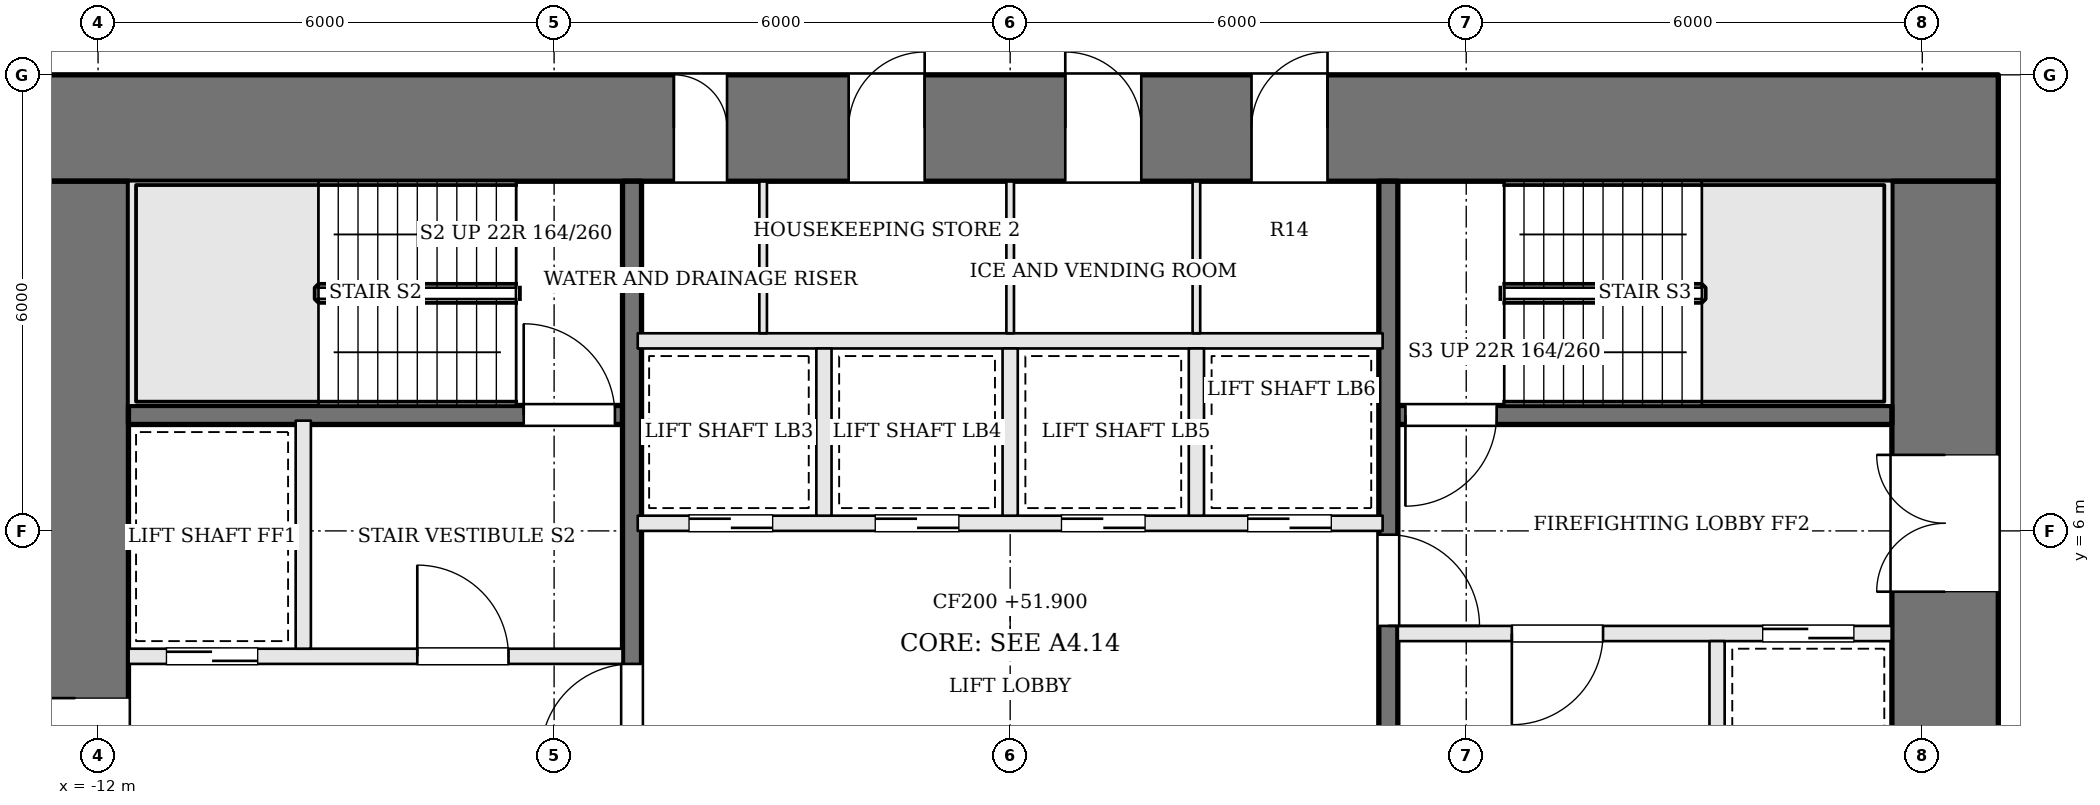
"""IFC4 building model, lengths in metres.
Left out: names, types, materials, properties, quantities, classifications, styles, units other than length and angle.
Written with IfcOpenShell. Run it as: python <this file> out.ifc"""

import sys

from ifc_helpers import new_model, si_unit, direction, frame, frame_2d, origin, place, context, subcontext, project, spatial, rectangle, extrude, element, fill, save


model = new_model("IFC4")
c1 = context("Model", 3, precision=1e-05, world=origin(), true_north=direction((0.0, 1.0)))
c2 = subcontext(c1, "Body", "Model", "MODEL_VIEW")
j1 = project(units=[si_unit("LENGTHUNIT", "METRE"), si_unit("PLANEANGLEUNIT", "RADIAN")], contexts=[c1])
p1 = place(None, origin())
s1 = spatial("IfcSite", under=j1, at=p1, CompositionType="ELEMENT")
p2 = place(p1, origin())
s2 = spatial("IfcBuilding", under=s1, at=p2, CompositionType="ELEMENT")
p3 = place(p2, frame((0.0, 0.0, 51.9)))
s3 = spatial("IfcBuildingStorey", under=s2, at=p3, CompositionType="ELEMENT", Elevation=51.9)
p4 = place(p3, frame((-13.0, 11.3, 0.0), z_axis=(0.0, 0.0, 1.0), x_axis=(1.0, 0.0, 0.0)))
e1 = element("IfcWall", 1, at=p4, inside=s3, PredefinedType="SHEAR", context=c2, shape_type="SweptSolid", body=[
    extrude(rectangle(XDim=26.0, YDim=1.4, at=frame_2d((13.0, 0.0))), origin(), (0.0, 0.0, 1.0), 3.6),
])
p5 = place(p4, frame((8.575, 0.0, 0.0)))
e2 = element("IfcOpeningElement", 2, at=p5, cuts=e1, PredefinedType="OPENING", context=c2, shape_type="SweptSolid", body=[
    extrude(rectangle(XDim=0.7, YDim=2.1, at=frame_2d((0.35, 1.05))), frame((0.0, 0.71, 0.0), z_axis=(0.0, -1.0, 0.0), x_axis=(1.0, 0.0, 0.0)), (0.0, 0.0, 1.0), 1.42),
])
p6 = place(p4, frame((10.875, 0.0, 0.0)))
e3 = element("IfcOpeningElement", 3, at=p6, cuts=e1, PredefinedType="OPENING", context=c2, shape_type="SweptSolid", body=[
    extrude(rectangle(XDim=1.0, YDim=2.1, at=frame_2d((0.5, 1.05))), frame((0.0, 0.71, 0.0), z_axis=(0.0, -1.0, 0.0), x_axis=(1.0, 0.0, 0.0)), (0.0, 0.0, 1.0), 1.42),
])
p7 = place(p4, frame((13.725, 0.0, 0.0)))
e4 = element("IfcOpeningElement", 4, at=p7, cuts=e1, PredefinedType="OPENING", context=c2, shape_type="SweptSolid", body=[
    extrude(rectangle(XDim=1.0, YDim=2.1, at=frame_2d((0.5, 1.05))), frame((0.0, 0.71, 0.0), z_axis=(0.0, -1.0, 0.0), x_axis=(1.0, 0.0, 0.0)), (0.0, 0.0, 1.0), 1.42),
])
p8 = place(p4, frame((16.175, 0.0, 0.0)))
e5 = element("IfcOpeningElement", 5, at=p8, cuts=e1, PredefinedType="OPENING", context=c2, shape_type="SweptSolid", body=[
    extrude(rectangle(XDim=1.0, YDim=2.1, at=frame_2d((0.5, 1.05))), frame((0.0, 0.71, 0.0), z_axis=(0.0, -1.0, 0.0), x_axis=(1.0, 0.0, 0.0)), (0.0, 0.0, 1.0), 1.42),
])
p9 = place(p3, frame((12.3, -1.6, 0.0), z_axis=(0.0, 0.0, 1.0), x_axis=(0.0, 1.0, 0.0)))
e6 = element("IfcWall", 6, at=p9, inside=s3, PredefinedType="SHEAR", context=c2, shape_type="SweptSolid", body=[
    extrude(rectangle(XDim=12.2, YDim=1.4, at=frame_2d((6.1, 0.0))), origin(), (0.0, 0.0, 1.0), 3.6),
])
p10 = place(p9, frame((6.8, 0.0, 0.0)))
e7 = element("IfcOpeningElement", 7, at=p10, cuts=e6, PredefinedType="OPENING", context=c2, shape_type="SweptSolid", body=[
    extrude(rectangle(XDim=1.8, YDim=2.1, at=frame_2d((0.9, 1.05))), frame((0.0, 0.71, 0.0), z_axis=(0.0, -1.0, 0.0), x_axis=(1.0, 0.0, 0.0)), (0.0, 0.0, 1.0), 1.42),
])
p11 = place(p3, frame((-12.3, -1.6, 0.0), z_axis=(0.0, 0.0, 1.0), x_axis=(0.0, 1.0, 0.0)))
e8 = element("IfcWall", 8, at=p11, inside=s3, PredefinedType="SHEAR", context=c2, shape_type="SweptSolid", body=[
    extrude(rectangle(XDim=12.2, YDim=1.4, at=frame_2d((6.1, 0.0))), origin(), (0.0, 0.0, 1.0), 3.6),
])
p12 = place(p11, frame((3.6, 0.0, 0.0)))
e9 = element("IfcOpeningElement", 9, at=p12, cuts=e8, PredefinedType="OPENING", context=c2, shape_type="SweptSolid", body=[
    extrude(rectangle(XDim=1.8, YDim=2.1, at=frame_2d((0.9, 1.05))), frame((0.0, 0.71, 0.0), z_axis=(0.0, -1.0, 0.0), x_axis=(1.0, 0.0, 0.0)), (0.0, 0.0, 1.0), 1.42),
])
p13 = place(p3, frame((11.6, 7.525, 0.0), z_axis=(0.0, 0.0, 1.0), x_axis=(-1.0, 0.0, 0.0)))
e10 = element("IfcWall", 10, at=p13, inside=s3, PredefinedType="SOLIDWALL", context=c2, shape_type="SweptSolid", body=[
    extrude(rectangle(XDim=6.5, YDim=0.25, at=frame_2d((3.25, 0.0))), origin(), (0.0, 0.0, 1.0), 3.4),
])
p14 = place(p13, frame((5.2, 0.0, 0.0)))
e11 = element("IfcOpeningElement", 11, at=p14, cuts=e10, PredefinedType="OPENING", context=c2, shape_type="SweptSolid", body=[
    extrude(rectangle(XDim=1.2, YDim=2.1, at=frame_2d((0.6, 1.05))), frame((0.0, 0.135, 0.0), z_axis=(0.0, -1.0, 0.0), x_axis=(1.0, 0.0, 0.0)), (0.0, 0.0, 1.0), 0.27),
])
p15 = place(p3, frame((-11.6, 4.35, 0.0), z_axis=(0.0, 0.0, 1.0), x_axis=(1.0, 0.0, 0.0)))
e12 = element("IfcWall", 12, at=p15, inside=s3, PredefinedType="SOLIDWALL", context=c2, shape_type="SweptSolid", body=[
    extrude(rectangle(XDim=6.5, YDim=0.2, at=frame_2d((3.25, 0.0))), origin(), (0.0, 0.0, 1.0), 3.4),
])
p16 = place(p15, frame((3.8, 0.0, 0.0)))
e13 = element("IfcOpeningElement", 13, at=p16, cuts=e12, PredefinedType="OPENING", context=c2, shape_type="SweptSolid", body=[
    extrude(rectangle(XDim=1.2, YDim=2.1, at=frame_2d((0.6, 1.05))), frame((0.0, 0.11, 0.0), z_axis=(0.0, -1.0, 0.0), x_axis=(1.0, 0.0, 0.0)), (0.0, 0.0, 1.0), 0.22),
])
p17 = place(p15, frame((0.5, 0.0, 0.0)))
e14 = element("IfcOpeningElement", 14, at=p17, cuts=e12, PredefinedType="OPENING", context=c2, shape_type="SweptSolid", body=[
    extrude(rectangle(XDim=1.2, YDim=2.1, at=frame_2d((0.6, 1.05))), frame((0.0, 0.11, 0.0), z_axis=(0.0, -1.0, 0.0), x_axis=(1.0, 0.0, 0.0)), (0.0, 0.0, 1.0), 0.22),
])
p18 = place(p3, frame((11.6, 4.65, 0.0), z_axis=(0.0, 0.0, 1.0), x_axis=(-1.0, 0.0, 0.0)))
e15 = element("IfcWall", 15, at=p18, inside=s3, PredefinedType="SOLIDWALL", context=c2, shape_type="SweptSolid", body=[
    extrude(rectangle(XDim=6.5, YDim=0.2, at=frame_2d((3.25, 0.0))), origin(), (0.0, 0.0, 1.0), 3.4),
])
p19 = place(p18, frame((3.8, 0.0, 0.0)))
e16 = element("IfcOpeningElement", 16, at=p19, cuts=e15, PredefinedType="OPENING", context=c2, shape_type="SweptSolid", body=[
    extrude(rectangle(XDim=1.2, YDim=2.1, at=frame_2d((0.6, 1.05))), frame((0.0, 0.11, 0.0), z_axis=(0.0, -1.0, 0.0), x_axis=(1.0, 0.0, 0.0)), (0.0, 0.0, 1.0), 0.22),
])
p20 = place(p18, frame((0.5, 0.0, 0.0)))
e17 = element("IfcOpeningElement", 17, at=p20, cuts=e15, PredefinedType="OPENING", context=c2, shape_type="SweptSolid", body=[
    extrude(rectangle(XDim=1.2, YDim=2.1, at=frame_2d((0.6, 1.05))), frame((0.0, 0.11, 0.0), z_axis=(0.0, -1.0, 0.0), x_axis=(1.0, 0.0, 0.0)), (0.0, 0.0, 1.0), 0.22),
])
p21 = place(p3, frame((-11.6, 7.525, 0.0), z_axis=(0.0, 0.0, 1.0), x_axis=(1.0, 0.0, 0.0)))
e18 = element("IfcWall", 18, at=p21, inside=s3, PredefinedType="SOLIDWALL", context=c2, shape_type="SweptSolid", body=[
    extrude(rectangle(XDim=6.5, YDim=0.25, at=frame_2d((3.25, 0.0))), origin(), (0.0, 0.0, 1.0), 3.4),
])
p22 = place(p21, frame((5.2, 0.0, 0.0)))
e19 = element("IfcOpeningElement", 19, at=p22, cuts=e18, PredefinedType="OPENING", context=c2, shape_type="SweptSolid", body=[
    extrude(rectangle(XDim=1.2, YDim=2.1, at=frame_2d((0.6, 1.05))), frame((0.0, 0.135, 0.0), z_axis=(0.0, -1.0, 0.0), x_axis=(1.0, 0.0, 0.0)), (0.0, 0.0, 1.0), 0.27),
])
for number, where, z_axis, x_axis in (
    (20, (-9.3, 4.45, 0.0), (0.0, 0.0, 1.0), (0.0, 1.0, 0.0)),
    (21, (9.3, 4.55, 0.0), (0.0, 0.0, 1.0), (0.0, -1.0, 0.0)),
):
    element("IfcWall", number, at=place(p3, frame(where, z_axis=z_axis, x_axis=x_axis)), inside=s3, PredefinedType="SOLIDWALL", context=c2, shape_type="SweptSolid", body=[
        extrude(rectangle(XDim=3.0, YDim=0.2, at=frame_2d((1.5, 0.0))), origin(), (0.0, 0.0, 1.0), 3.4),
    ])
p23 = place(p3, frame((-4.975, -1.6, 0.0), z_axis=(0.0, 0.0, 1.0), x_axis=(0.0, 1.0, 0.0)))
e22 = element("IfcWall", 22, at=p23, inside=s3, PredefinedType="SOLIDWALL", context=c2, shape_type="SweptSolid", body=[
    extrude(rectangle(XDim=12.2, YDim=0.25, at=frame_2d((6.1, 0.0))), origin(), (0.0, 0.0, 1.0), 3.4),
])
p24 = place(p23, frame((4.65, 0.0, 0.0)))
e23 = element("IfcOpeningElement", 23, at=p24, cuts=e22, PredefinedType="OPENING", context=c2, shape_type="SweptSolid", body=[
    extrude(rectangle(XDim=1.2, YDim=2.1, at=frame_2d((0.6, 1.05))), frame((0.0, 0.135, 0.0), z_axis=(0.0, -1.0, 0.0), x_axis=(1.0, 0.0, 0.0)), (0.0, 0.0, 1.0), 0.27),
])
p25 = place(p3, frame((4.975, 10.6, 0.0), z_axis=(0.0, 0.0, 1.0), x_axis=(0.0, -1.0, 0.0)))
e24 = element("IfcWall", 24, at=p25, inside=s3, PredefinedType="SOLIDWALL", context=c2, shape_type="SweptSolid", body=[
    extrude(rectangle(XDim=12.2, YDim=0.25, at=frame_2d((6.1, 0.0))), origin(), (0.0, 0.0, 1.0), 3.4),
])
p26 = place(p25, frame((4.65, 0.0, 0.0)))
e25 = element("IfcOpeningElement", 25, at=p26, cuts=e24, PredefinedType="OPENING", context=c2, shape_type="SweptSolid", body=[
    extrude(rectangle(XDim=1.2, YDim=2.1, at=frame_2d((0.6, 1.05))), frame((0.0, 0.135, 0.0), z_axis=(0.0, -1.0, 0.0), x_axis=(1.0, 0.0, 0.0)), (0.0, 0.0, 1.0), 0.27),
])
p27 = place(p3, frame((-4.9, 6.1, 0.0), z_axis=(0.0, 0.0, 1.0), x_axis=(1.0, 0.0, 0.0)))
e26 = element("IfcWall", 26, at=p27, inside=s3, PredefinedType="SOLIDWALL", context=c2, shape_type="SweptSolid", body=[
    extrude(rectangle(XDim=9.8, YDim=0.2, at=frame_2d((4.9, 0.0))), origin(), (0.0, 0.0, 1.0), 3.4),
])
p28 = place(p27, frame((0.675, 0.0, 0.0)))
e27 = element("IfcOpeningElement", 27, at=p28, cuts=e26, PredefinedType="OPENING", context=c2, shape_type="SweptSolid", body=[
    extrude(rectangle(XDim=1.1, YDim=2.1, at=frame_2d((0.55, 1.05))), frame((0.0, 0.11, 0.0), z_axis=(0.0, -1.0, 0.0), x_axis=(1.0, 0.0, 0.0)), (0.0, 0.0, 1.0), 0.22),
])
p29 = place(p27, frame((3.125, 0.0, 0.0)))
e28 = element("IfcOpeningElement", 28, at=p29, cuts=e26, PredefinedType="OPENING", context=c2, shape_type="SweptSolid", body=[
    extrude(rectangle(XDim=1.1, YDim=2.1, at=frame_2d((0.55, 1.05))), frame((0.0, 0.11, 0.0), z_axis=(0.0, -1.0, 0.0), x_axis=(1.0, 0.0, 0.0)), (0.0, 0.0, 1.0), 0.22),
])
p30 = place(p27, frame((5.575, 0.0, 0.0)))
e29 = element("IfcOpeningElement", 29, at=p30, cuts=e26, PredefinedType="OPENING", context=c2, shape_type="SweptSolid", body=[
    extrude(rectangle(XDim=1.1, YDim=2.1, at=frame_2d((0.55, 1.05))), frame((0.0, 0.11, 0.0), z_axis=(0.0, -1.0, 0.0), x_axis=(1.0, 0.0, 0.0)), (0.0, 0.0, 1.0), 0.22),
])
p31 = place(p27, frame((8.025, 0.0, 0.0)))
e30 = element("IfcOpeningElement", 30, at=p31, cuts=e26, PredefinedType="OPENING", context=c2, shape_type="SweptSolid", body=[
    extrude(rectangle(XDim=1.1, YDim=2.1, at=frame_2d((0.55, 1.05))), frame((0.0, 0.11, 0.0), z_axis=(0.0, -1.0, 0.0), x_axis=(1.0, 0.0, 0.0)), (0.0, 0.0, 1.0), 0.22),
])
p32 = place(p3, frame((-4.9, 8.5, 0.0), z_axis=(0.0, 0.0, 1.0), x_axis=(1.0, 0.0, 0.0)))
e31 = element("IfcWall", 31, at=p32, inside=s3, PredefinedType="SOLIDWALL", context=c2, shape_type="SweptSolid", body=[
    extrude(rectangle(XDim=9.8, YDim=0.2, at=frame_2d((4.9, 0.0))), origin(), (0.0, 0.0, 1.0), 3.4),
])
for number, where, z_axis, x_axis in (
    (32, (-2.45, 6.2, 0.0), (0.0, 0.0, 1.0), (0.0, 1.0, 0.0)),
    (33, (0.0, 6.2, 0.0), (0.0, 0.0, 1.0), (0.0, 1.0, 0.0)),
    (34, (2.45, 6.2, 0.0), (0.0, 0.0, 1.0), (0.0, 1.0, 0.0)),
):
    element("IfcWall", number, at=place(p3, frame(where, z_axis=z_axis, x_axis=x_axis)), inside=s3, PredefinedType="SOLIDWALL", context=c2, shape_type="SweptSolid", body=[
        extrude(rectangle(XDim=2.2, YDim=0.2, at=frame_2d((1.1, 0.0))), origin(), (0.0, 0.0, 1.0), 3.4),
    ])
for number, where, z_axis, x_axis in (
    (35, (-3.25, 8.6, 0.0), (0.0, 0.0, 1.0), (0.0, 1.0, 0.0)),
    (36, (0.0, 8.6, 0.0), (0.0, 0.0, 1.0), (0.0, 1.0, 0.0)),
    (37, (2.45, 8.6, 0.0), (0.0, 0.0, 1.0), (0.0, 1.0, 0.0)),
):
    element("IfcWall", number, at=place(p3, frame(where, z_axis=z_axis, x_axis=x_axis)), inside=s3, PredefinedType="PARTITIONING", context=c2, shape_type="SweptSolid", body=[
        extrude(rectangle(XDim=2.0, YDim=0.1, at=frame_2d((1.0, 0.0))), origin(), (0.0, 0.0, 1.0), 3.4),
    ])
p33 = place(p12, origin())
e38 = element("IfcDoor", 38, at=p33, inside=s3, OperationType="DOUBLE_DOOR_SINGLE_SWING", PredefinedType="DOOR", context=c2, shape_type="SweptSolid", body=[
    extrude(rectangle(XDim=1.8, YDim=2.1, at=frame_2d((0.9, 1.05))), frame((0.0, 0.025, 0.0), z_axis=(0.0, -1.0, 0.0), x_axis=(1.0, 0.0, 0.0)), (0.0, 0.0, 1.0), 0.05),
])
fill(e9, e38)
p34 = place(p10, origin())
e39 = element("IfcDoor", 39, at=p34, inside=s3, OperationType="DOUBLE_DOOR_SINGLE_SWING", PredefinedType="DOOR", context=c2, shape_type="SweptSolid", body=[
    extrude(rectangle(XDim=1.8, YDim=2.1, at=frame_2d((0.9, 1.05))), frame((0.0, 0.025, 0.0), z_axis=(0.0, -1.0, 0.0), x_axis=(1.0, 0.0, 0.0)), (0.0, 0.0, 1.0), 0.05),
])
fill(e7, e39)
p35 = place(p24, origin())
e40 = element("IfcDoor", 40, at=p35, inside=s3, OperationType="SINGLE_SWING_LEFT", PredefinedType="DOOR", context=c2, shape_type="SweptSolid", body=[
    extrude(rectangle(XDim=1.2, YDim=2.1, at=frame_2d((0.6, 1.05))), frame((0.0, 0.025, 0.0), z_axis=(0.0, -1.0, 0.0), x_axis=(1.0, 0.0, 0.0)), (0.0, 0.0, 1.0), 0.05),
])
fill(e23, e40)
p36 = place(p26, origin())
e41 = element("IfcDoor", 41, at=p36, inside=s3, OperationType="SINGLE_SWING_RIGHT", PredefinedType="DOOR", context=c2, shape_type="SweptSolid", body=[
    extrude(rectangle(XDim=1.2, YDim=2.1, at=frame_2d((0.6, 1.05))), frame((0.0, 0.025, 0.0), z_axis=(0.0, -1.0, 0.0), x_axis=(1.0, 0.0, 0.0)), (0.0, 0.0, 1.0), 0.05),
])
fill(e25, e41)
p37 = place(p16, origin())
e42 = element("IfcDoor", 42, at=p37, inside=s3, OperationType="SINGLE_SWING_LEFT", PredefinedType="DOOR", context=c2, shape_type="SweptSolid", body=[
    extrude(rectangle(XDim=1.2, YDim=2.1, at=frame_2d((0.6, 1.05))), frame((0.0, 0.025, 0.0), z_axis=(0.0, -1.0, 0.0), x_axis=(1.0, 0.0, 0.0)), (0.0, 0.0, 1.0), 0.05),
])
fill(e13, e42)
p38 = place(p19, origin())
e43 = element("IfcDoor", 43, at=p38, inside=s3, OperationType="SINGLE_SWING_RIGHT", PredefinedType="DOOR", context=c2, shape_type="SweptSolid", body=[
    extrude(rectangle(XDim=1.2, YDim=2.1, at=frame_2d((0.6, 1.05))), frame((0.0, 0.025, 0.0), z_axis=(0.0, -1.0, 0.0), x_axis=(1.0, 0.0, 0.0)), (0.0, 0.0, 1.0), 0.05),
])
fill(e16, e43)
p39 = place(p14, origin())
e44 = element("IfcDoor", 44, at=p39, inside=s3, OperationType="SINGLE_SWING_RIGHT", PredefinedType="DOOR", context=c2, shape_type="SweptSolid", body=[
    extrude(rectangle(XDim=1.2, YDim=2.1, at=frame_2d((0.6, 1.05))), frame((0.0, 0.025, 0.0), z_axis=(0.0, -1.0, 0.0), x_axis=(1.0, 0.0, 0.0)), (0.0, 0.0, 1.0), 0.05),
])
fill(e11, e44)
p40 = place(p22, origin())
e45 = element("IfcDoor", 45, at=p40, inside=s3, OperationType="SINGLE_SWING_LEFT", PredefinedType="DOOR", context=c2, shape_type="SweptSolid", body=[
    extrude(rectangle(XDim=1.2, YDim=2.1, at=frame_2d((0.6, 1.05))), frame((0.0, 0.025, 0.0), z_axis=(0.0, -1.0, 0.0), x_axis=(1.0, 0.0, 0.0)), (0.0, 0.0, 1.0), 0.05),
])
fill(e19, e45)
p41 = place(p17, origin())
e46 = element("IfcDoor", 46, at=p41, inside=s3, OperationType="SLIDING_TO_RIGHT", PredefinedType="DOOR", context=c2, shape_type="SweptSolid", body=[
    extrude(rectangle(XDim=1.2, YDim=2.1, at=frame_2d((0.6, 1.05))), frame((0.0, 0.025, 0.0), z_axis=(0.0, -1.0, 0.0), x_axis=(1.0, 0.0, 0.0)), (0.0, 0.0, 1.0), 0.05),
])
fill(e14, e46)
p42 = place(p20, origin())
e47 = element("IfcDoor", 47, at=p42, inside=s3, OperationType="SLIDING_TO_RIGHT", PredefinedType="DOOR", context=c2, shape_type="SweptSolid", body=[
    extrude(rectangle(XDim=1.2, YDim=2.1, at=frame_2d((0.6, 1.05))), frame((0.0, 0.025, 0.0), z_axis=(0.0, -1.0, 0.0), x_axis=(1.0, 0.0, 0.0)), (0.0, 0.0, 1.0), 0.05),
])
fill(e17, e47)
p43 = place(p28, origin())
e48 = element("IfcDoor", 48, at=p43, inside=s3, OperationType="SLIDING_TO_RIGHT", PredefinedType="DOOR", context=c2, shape_type="SweptSolid", body=[
    extrude(rectangle(XDim=1.1, YDim=2.1, at=frame_2d((0.55, 1.05))), frame((0.0, 0.025, 0.0), z_axis=(0.0, -1.0, 0.0), x_axis=(1.0, 0.0, 0.0)), (0.0, 0.0, 1.0), 0.05),
])
fill(e27, e48)
p44 = place(p29, origin())
e49 = element("IfcDoor", 49, at=p44, inside=s3, OperationType="SLIDING_TO_LEFT", PredefinedType="DOOR", context=c2, shape_type="SweptSolid", body=[
    extrude(rectangle(XDim=1.1, YDim=2.1, at=frame_2d((0.55, 1.05))), frame((0.0, 0.025, 0.0), z_axis=(0.0, -1.0, 0.0), x_axis=(1.0, 0.0, 0.0)), (0.0, 0.0, 1.0), 0.05),
])
fill(e28, e49)
p45 = place(p30, origin())
e50 = element("IfcDoor", 50, at=p45, inside=s3, OperationType="SLIDING_TO_RIGHT", PredefinedType="DOOR", context=c2, shape_type="SweptSolid", body=[
    extrude(rectangle(XDim=1.1, YDim=2.1, at=frame_2d((0.55, 1.05))), frame((0.0, 0.025, 0.0), z_axis=(0.0, -1.0, 0.0), x_axis=(1.0, 0.0, 0.0)), (0.0, 0.0, 1.0), 0.05),
])
fill(e29, e50)
p46 = place(p31, origin())
e51 = element("IfcDoor", 51, at=p46, inside=s3, OperationType="SLIDING_TO_LEFT", PredefinedType="DOOR", context=c2, shape_type="SweptSolid", body=[
    extrude(rectangle(XDim=1.1, YDim=2.1, at=frame_2d((0.55, 1.05))), frame((0.0, 0.025, 0.0), z_axis=(0.0, -1.0, 0.0), x_axis=(1.0, 0.0, 0.0)), (0.0, 0.0, 1.0), 0.05),
])
fill(e30, e51)
p47 = place(p5, origin())
e52 = element("IfcDoor", 52, at=p47, inside=s3, OperationType="SINGLE_SWING_LEFT", PredefinedType="DOOR", context=c2, shape_type="SweptSolid", body=[
    extrude(rectangle(XDim=0.7, YDim=2.1, at=frame_2d((0.35, 1.05))), frame((0.0, 0.025, 0.0), z_axis=(0.0, -1.0, 0.0), x_axis=(1.0, 0.0, 0.0)), (0.0, 0.0, 1.0), 0.05),
])
fill(e2, e52)
p48 = place(p6, origin())
e53 = element("IfcDoor", 53, at=p48, inside=s3, OperationType="SINGLE_SWING_RIGHT", PredefinedType="DOOR", context=c2, shape_type="SweptSolid", body=[
    extrude(rectangle(XDim=1.0, YDim=2.1, at=frame_2d((0.5, 1.05))), frame((0.0, 0.025, 0.0), z_axis=(0.0, -1.0, 0.0), x_axis=(1.0, 0.0, 0.0)), (0.0, 0.0, 1.0), 0.05),
])
fill(e3, e53)
p49 = place(p7, origin())
e54 = element("IfcDoor", 54, at=p49, inside=s3, OperationType="SINGLE_SWING_LEFT", PredefinedType="DOOR", context=c2, shape_type="SweptSolid", body=[
    extrude(rectangle(XDim=1.0, YDim=2.1, at=frame_2d((0.5, 1.05))), frame((0.0, 0.025, 0.0), z_axis=(0.0, -1.0, 0.0), x_axis=(1.0, 0.0, 0.0)), (0.0, 0.0, 1.0), 0.05),
])
fill(e4, e54)
p50 = place(p8, origin())
e55 = element("IfcDoor", 55, at=p50, inside=s3, OperationType="SINGLE_SWING_RIGHT", PredefinedType="DOOR", context=c2, shape_type="SweptSolid", body=[
    extrude(rectangle(XDim=1.0, YDim=2.1, at=frame_2d((0.5, 1.05))), frame((0.0, 0.025, 0.0), z_axis=(0.0, -1.0, 0.0), x_axis=(1.0, 0.0, 0.0)), (0.0, 0.0, 1.0), 0.05),
])
fill(e5, e55)
save(model, sys.argv[1])
